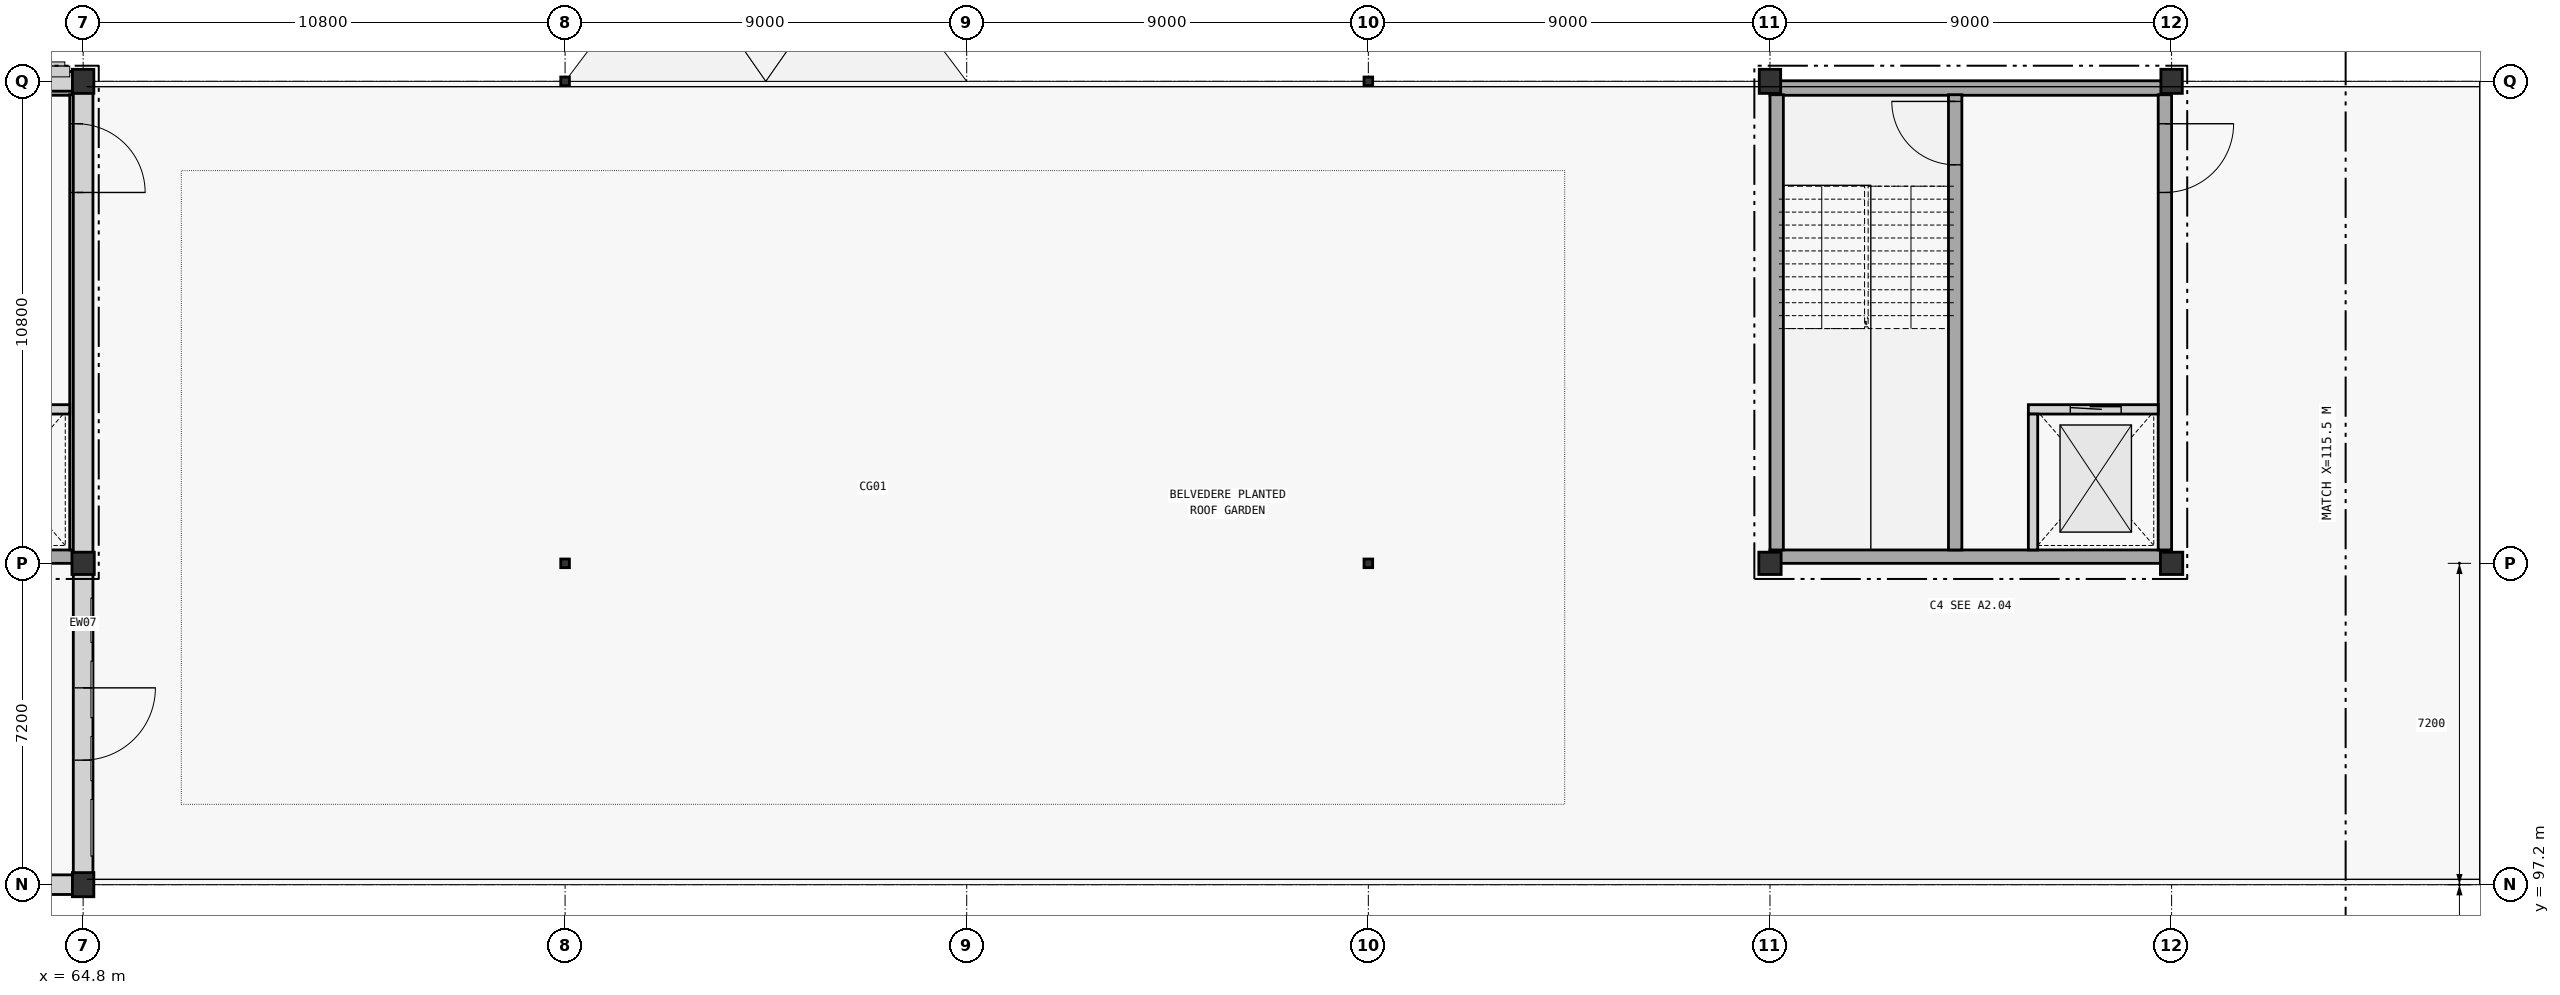
"""IFC4 building model, lengths in metres.
Left out: names, types, materials, properties, quantities, classifications, styles, units other than length and angle.
Written with IfcOpenShell. Run it as: python <this file> out.ifc"""

import sys

from ifc_helpers import new_model, si_unit, direction, frame, frame_2d, origin, origin_2d, place, context, subcontext, project, spatial, rectangle, hollow_circle, extrude, element, fill, save


model = new_model("IFC4")
c1 = context("Model", 3, precision=1e-05, world=origin(), true_north=direction((0.0, 1.0)))
c2 = subcontext(c1, "Body", "Model", "MODEL_VIEW")
j1 = project(units=[si_unit("LENGTHUNIT", "METRE"), si_unit("PLANEANGLEUNIT", "RADIAN")], contexts=[c1])
p1 = place(None, origin())
s1 = spatial("IfcSite", under=j1, at=p1, CompositionType="ELEMENT")
p2 = place(p1, origin())
s2 = spatial("IfcBuilding", under=s1, at=p2, CompositionType="ELEMENT")
p3 = place(p2, frame((0.0, 0.0, 19.2)))
s3 = spatial("IfcBuildingStorey", under=s2, at=p3, CompositionType="ELEMENT", Elevation=19.2)
p4 = place(p3, frame((64.8, 97.2, 0.0), z_axis=(0.0, 0.0, 1.0), x_axis=(1.0, 0.0, 0.0)))
e1 = element("IfcColumn", 1, at=p4, inside=s3, PredefinedType="COLUMN", context=c2, shape_type="SweptSolid", body=[
    extrude(rectangle(XDim=0.48, YDim=0.54, at=origin_2d()), origin(), (0.0, 0.0, 1.0), 4.2),
])
p5 = place(p3, frame((64.8, 104.4, 0.0), z_axis=(0.0, 0.0, 1.0), x_axis=(1.0, 0.0, 0.0)))
e2 = element("IfcColumn", 2, at=p5, inside=s3, PredefinedType="COLUMN", context=c2, shape_type="SweptSolid", body=[
    extrude(rectangle(XDim=0.5, YDim=0.5, at=origin_2d()), origin(), (0.0, 0.0, 1.0), 4.2),
])
p6 = place(p3, frame((64.8, 115.2, 0.0), z_axis=(0.0, 0.0, 1.0), x_axis=(1.0, 0.0, 0.0)))
e3 = element("IfcColumn", 3, at=p6, inside=s3, PredefinedType="COLUMN", context=c2, shape_type="SweptSolid", body=[
    extrude(rectangle(XDim=0.48, YDim=0.54, at=origin_2d()), origin(), (0.0, 0.0, 1.0), 4.2),
])
p7 = place(p3, frame((102.6, 104.4, 0.0), z_axis=(0.0, 0.0, 1.0), x_axis=(1.0, 0.0, 0.0)))
e4 = element("IfcColumn", 4, at=p7, inside=s3, PredefinedType="COLUMN", context=c2, shape_type="SweptSolid", body=[
    extrude(rectangle(XDim=0.5, YDim=0.5, at=origin_2d()), origin(), (0.0, 0.0, 1.0), 4.2),
])
p8 = place(p3, frame((102.6, 115.2, 0.0), z_axis=(0.0, 0.0, 1.0), x_axis=(1.0, 0.0, 0.0)))
e5 = element("IfcColumn", 5, at=p8, inside=s3, PredefinedType="COLUMN", context=c2, shape_type="SweptSolid", body=[
    extrude(rectangle(XDim=0.48, YDim=0.54, at=origin_2d()), origin(), (0.0, 0.0, 1.0), 4.2),
])
p9 = place(p3, frame((111.6, 104.4, 0.0), z_axis=(0.0, 0.0, 1.0), x_axis=(1.0, 0.0, 0.0)))
e6 = element("IfcColumn", 6, at=p9, inside=s3, PredefinedType="COLUMN", context=c2, shape_type="SweptSolid", body=[
    extrude(rectangle(XDim=0.5, YDim=0.5, at=origin_2d()), origin(), (0.0, 0.0, 1.0), 4.2),
])
p10 = place(p3, frame((111.6, 115.2, 0.0), z_axis=(0.0, 0.0, 1.0), x_axis=(1.0, 0.0, 0.0)))
e7 = element("IfcColumn", 7, at=p10, inside=s3, PredefinedType="COLUMN", context=c2, shape_type="SweptSolid", body=[
    extrude(rectangle(XDim=0.48, YDim=0.54, at=origin_2d()), origin(), (0.0, 0.0, 1.0), 4.2),
])
p11 = place(p3, frame((64.8, 104.55, 0.0), z_axis=(0.0, 0.0, 1.0), x_axis=(-1.0, 0.0, 0.0)))
e8 = element("IfcWall", 8, at=p11, inside=s3, PredefinedType="SHEAR", context=c2, shape_type="SweptSolid", body=[
    extrude(rectangle(XDim=10.8, YDim=0.3, at=frame_2d((5.4, 0.0))), origin(), (0.0, 0.0, 1.0), 4.2),
])
p12 = place(p3, frame((54.0, 115.05, 0.0), z_axis=(0.0, 0.0, 1.0), x_axis=(1.0, 0.0, 0.0)))
e9 = element("IfcWall", 9, at=p12, inside=s3, PredefinedType="SHEAR", context=c2, shape_type="SweptSolid", body=[
    extrude(rectangle(XDim=10.8, YDim=0.325, at=frame_2d((5.4, 0.0))), origin(), (0.0, 0.0, 1.0), 4.2),
])
p13 = place(p3, frame((64.65, 114.9, 0.0), z_axis=(0.0, 0.0, 1.0), x_axis=(0.0, -1.0, 0.0)))
e10 = element("IfcWall", 10, at=p13, inside=s3, PredefinedType="SHEAR", context=c2, shape_type="SweptSolid", body=[
    extrude(rectangle(XDim=10.2, YDim=0.3, at=frame_2d((5.1, 0.0))), origin(), (0.0, 0.0, 1.0), 4.2),
])
p14 = place(p13, frame((0.65, 0.0, 0.0)))
e11 = element("IfcOpeningElement", 11, at=p14, cuts=e10, PredefinedType="OPENING", context=c2, shape_type="SweptSolid", body=[
    extrude(rectangle(XDim=1.54, YDim=2.22, at=frame_2d((0.77, 1.11))), frame((0.0, 0.15, 0.0), z_axis=(0.0, -1.0, 0.0), x_axis=(1.0, 0.0, 0.0)), (0.0, 0.0, 1.0), 0.3),
])
p15 = place(p3, frame((111.6, 104.55, 0.0), z_axis=(0.0, 0.0, 1.0), x_axis=(-1.0, 0.0, 0.0)))
e12 = element("IfcWall", 12, at=p15, inside=s3, PredefinedType="SHEAR", context=c2, shape_type="SweptSolid", body=[
    extrude(rectangle(XDim=9.0, YDim=0.3, at=frame_2d((4.5, 0.0))), origin(), (0.0, 0.0, 1.0), 4.2),
])
p16 = place(p3, frame((102.6, 115.05, 0.0), z_axis=(0.0, 0.0, 1.0), x_axis=(1.0, 0.0, 0.0)))
e13 = element("IfcWall", 13, at=p16, inside=s3, PredefinedType="SHEAR", context=c2, shape_type="SweptSolid", body=[
    extrude(rectangle(XDim=9.0, YDim=0.325, at=frame_2d((4.5, 0.0))), origin(), (0.0, 0.0, 1.0), 4.2),
])
p17 = place(p3, frame((102.75, 104.7, 0.0), z_axis=(0.0, 0.0, 1.0), x_axis=(0.0, 1.0, 0.0)))
e14 = element("IfcWall", 14, at=p17, inside=s3, PredefinedType="SHEAR", context=c2, shape_type="SweptSolid", body=[
    extrude(rectangle(XDim=10.2, YDim=0.3, at=frame_2d((5.1, 0.0))), origin(), (0.0, 0.0, 1.0), 4.2),
])
p18 = place(p3, frame((111.45, 114.9, 0.0), z_axis=(0.0, 0.0, 1.0), x_axis=(0.0, -1.0, 0.0)))
e15 = element("IfcWall", 15, at=p18, inside=s3, PredefinedType="SHEAR", context=c2, shape_type="SweptSolid", body=[
    extrude(rectangle(XDim=10.2, YDim=0.3, at=frame_2d((5.1, 0.0))), origin(), (0.0, 0.0, 1.0), 4.2),
])
p19 = place(p18, frame((0.65, 0.0, 0.0)))
e16 = element("IfcOpeningElement", 16, at=p19, cuts=e15, PredefinedType="OPENING", context=c2, shape_type="SweptSolid", body=[
    extrude(rectangle(XDim=1.54, YDim=2.22, at=frame_2d((0.77, 1.11))), frame((0.0, 0.15, 0.0), z_axis=(0.0, -1.0, 0.0), x_axis=(1.0, 0.0, 0.0)), (0.0, 0.0, 1.0), 0.3),
])
p20 = place(p3, frame((106.75, 104.7, 0.0), z_axis=(0.0, 0.0, 1.0), x_axis=(0.0, 1.0, 0.0)))
e17 = element("IfcWall", 17, at=p20, inside=s3, PredefinedType="SHEAR", context=c2, shape_type="SweptSolid", body=[
    extrude(rectangle(XDim=10.2, YDim=0.3, at=frame_2d((5.1, 0.0))), origin(), (0.0, 0.0, 1.0), 4.2),
])
p21 = place(p20, frame((8.63, 0.0, 0.0)))
e18 = element("IfcOpeningElement", 18, at=p21, cuts=e17, PredefinedType="OPENING", context=c2, shape_type="SweptSolid", body=[
    extrude(rectangle(XDim=1.42, YDim=2.2, at=frame_2d((0.71, 1.1))), frame((0.0, 0.15, 0.0), z_axis=(0.0, -1.0, 0.0), x_axis=(1.0, 0.0, 0.0)), (0.0, 0.0, 1.0), 0.3),
])
for number, where, z_axis, x_axis in (
    (19, (75.6, 104.4, 0.0), (0.0, 0.0, 1.0), (1.0, 0.0, 0.0)),
    (20, (93.6, 104.4, 0.0), (0.0, 0.0, 1.0), (1.0, 0.0, 0.0)),
    (21, (75.6, 115.2, 0.0), (0.0, 0.0, 1.0), (1.0, 0.0, 0.0)),
    (22, (93.6, 115.2, 0.0), (0.0, 0.0, 1.0), (1.0, 0.0, 0.0)),
):
    element("IfcColumn", number, at=place(p3, frame(where, z_axis=z_axis, x_axis=x_axis)), inside=s3, PredefinedType="COLUMN", context=c2, shape_type="SweptSolid", body=[
        extrude(hollow_circle(Radius=0.097, WallThickness=0.01, at=origin_2d()), origin(), (0.0, 0.0, 1.0), 2.85),
    ])
p22 = place(p3, frame((64.8, 104.154, 0.0), z_axis=(0.0, 0.0, 1.0), x_axis=(0.0, -1.0, 0.0)))
e23 = element("IfcWall", 23, at=p22, inside=s3, PredefinedType="STANDARD", context=c2, shape_type="SweptSolid", body=[
    extrude(rectangle(XDim=6.688, YDim=0.38, at=frame_2d((3.344, 0.0))), origin(), (0.0, 0.0, 1.0), 3.245),
])
p23 = place(p22, frame((2.544, 0.0, 0.0)))
e24 = element("IfcOpeningElement", 24, at=p23, cuts=e23, PredefinedType="OPENING", context=c2, shape_type="SweptSolid", body=[
    extrude(rectangle(XDim=1.62, YDim=2.26, at=frame_2d((0.81, 1.13))), frame((0.0, 0.19, 0.0), z_axis=(0.0, -1.0, 0.0), x_axis=(1.0, 0.0, 0.0)), (0.0, 0.0, 1.0), 0.38),
])
p24 = place(p3, frame((64.564, 97.2, 0.0), z_axis=(0.0, 0.0, 1.0), x_axis=(-1.0, 0.0, 0.0)))
e25 = element("IfcWall", 25, at=p24, inside=s3, PredefinedType="STANDARD", context=c2, shape_type="SweptSolid", body=[
    extrude(rectangle(XDim=10.328, YDim=0.38, at=frame_2d((5.164, 0.0))), origin(), (0.0, 0.0, 1.0), 3.155),
])
p25 = place(p24, frame((4.484, 0.0, 0.9)))
e26 = element("IfcOpeningElement", 26, at=p25, cuts=e25, PredefinedType="OPENING", context=c2, shape_type="SweptSolid", body=[
    extrude(rectangle(XDim=1.36, YDim=1.86, at=frame_2d((0.68, 0.93))), frame((0.0, 0.19, 0.0), z_axis=(0.0, -1.0, 0.0), x_axis=(1.0, 0.0, 0.0)), (0.0, 0.0, 1.0), 0.38),
])
p26 = place(p3, frame((0.1, 115.2, 4.2), z_axis=(0.0, 0.0, 1.0), x_axis=(1.0, 0.0, 0.0)))
e27 = element("IfcWall", 27, at=p26, inside=s3, PredefinedType="PARAPET", context=c2, shape_type="SweptSolid", body=[
    extrude(rectangle(XDim=64.6, YDim=0.44, at=frame_2d((32.3, 0.0))), origin(), (0.0, 0.0, 1.0), 0.95),
])
p27 = place(p3, frame((64.8, 115.1, 4.2), z_axis=(0.0, 0.0, 1.0), x_axis=(0.0, -1.0, 0.0)))
e28 = element("IfcWall", 28, at=p27, inside=s3, PredefinedType="PARAPET", context=c2, shape_type="SweptSolid", body=[
    extrude(rectangle(XDim=17.8, YDim=0.44, at=frame_2d((8.9, 0.0))), origin(), (0.0, 0.0, 1.0), 0.95),
])
p28 = place(p3, frame((64.7, 97.2, 4.2), z_axis=(0.0, 0.0, 1.0), x_axis=(-1.0, 0.0, 0.0)))
e29 = element("IfcWall", 29, at=p28, inside=s3, PredefinedType="PARAPET", context=c2, shape_type="SweptSolid", body=[
    extrude(rectangle(XDim=64.6, YDim=0.44, at=frame_2d((32.3, 0.0))), origin(), (0.0, 0.0, 1.0), 0.95),
])
p29 = place(p3, frame((61.59, 107.85, 0.0), z_axis=(0.0, 0.0, 1.0), x_axis=(1.0, 0.0, 0.0)))
e30 = element("IfcWall", 30, at=p29, inside=s3, PredefinedType="STANDARD", context=c2, shape_type="SweptSolid", body=[
    extrude(rectangle(XDim=2.91, YDim=0.21, at=frame_2d((1.455, 0.0))), origin(), (0.0, 0.0, 1.0), 4.2),
])
p30 = place(p29, frame((0.99, 0.0, 0.0)))
e31 = element("IfcOpeningElement", 31, at=p30, cuts=e30, PredefinedType="OPENING", context=c2, shape_type="SweptSolid", body=[
    extrude(rectangle(XDim=1.04, YDim=2.16, at=frame_2d((0.52, 1.08))), frame((0.0, 0.105, 0.0), z_axis=(0.0, -1.0, 0.0), x_axis=(1.0, 0.0, 0.0)), (0.0, 0.0, 1.0), 0.21),
])
p31 = place(p3, frame((108.39, 107.85, 0.0), z_axis=(0.0, 0.0, 1.0), x_axis=(1.0, 0.0, 0.0)))
e32 = element("IfcWall", 32, at=p31, inside=s3, PredefinedType="STANDARD", context=c2, shape_type="SweptSolid", body=[
    extrude(rectangle(XDim=2.91, YDim=0.21, at=frame_2d((1.455, 0.0))), origin(), (0.0, 0.0, 1.0), 4.2),
])
p32 = place(p31, frame((0.94, 0.0, 0.0)))
e33 = element("IfcOpeningElement", 33, at=p32, cuts=e32, PredefinedType="OPENING", context=c2, shape_type="SweptSolid", body=[
    extrude(rectangle(XDim=1.14, YDim=2.16, at=frame_2d((0.57, 1.08))), frame((0.0, 0.105, 0.0), z_axis=(0.0, -1.0, 0.0), x_axis=(1.0, 0.0, 0.0)), (0.0, 0.0, 1.0), 0.21),
])
p33 = place(p3, frame((108.495, 104.7, 0.0), z_axis=(0.0, 0.0, 1.0), x_axis=(0.0, 1.0, 0.0)))
e34 = element("IfcWall", 34, at=p33, inside=s3, PredefinedType="STANDARD", context=c2, shape_type="SweptSolid", body=[
    extrude(rectangle(XDim=3.045, YDim=0.21, at=frame_2d((1.522, 0.0))), origin(), (0.0, 0.0, 1.0), 4.2),
])
p34 = place(p23, origin())
e35 = element("IfcDoor", 35, at=p34, inside=s3, OperationType="SINGLE_SWING_LEFT", PredefinedType="DOOR", context=c2, shape_type="SweptSolid", body=[
    extrude(rectangle(XDim=1.62, YDim=2.26, at=frame_2d((0.81, 1.13))), frame((0.0, 0.025, 0.0), z_axis=(0.0, -1.0, 0.0), x_axis=(1.0, 0.0, 0.0)), (0.0, 0.0, 1.0), 0.05),
])
fill(e24, e35)
p35 = place(p14, origin())
e36 = element("IfcDoor", 36, at=p35, inside=s3, OperationType="SINGLE_SWING_RIGHT", PredefinedType="DOOR", context=c2, shape_type="SweptSolid", body=[
    extrude(rectangle(XDim=1.54, YDim=2.22, at=frame_2d((0.77, 1.11))), frame((0.0, 0.025, 0.0), z_axis=(0.0, -1.0, 0.0), x_axis=(1.0, 0.0, 0.0)), (0.0, 0.0, 1.0), 0.05),
])
fill(e11, e36)
p36 = place(p32, origin())
e37 = element("IfcDoor", 37, at=p36, inside=s3, OperationType="SLIDING_TO_LEFT", PredefinedType="DOOR", context=c2, shape_type="SweptSolid", body=[
    extrude(rectangle(XDim=1.14, YDim=2.16, at=frame_2d((0.57, 1.08))), frame((0.0, 0.025, 0.0), z_axis=(0.0, -1.0, 0.0), x_axis=(1.0, 0.0, 0.0)), (0.0, 0.0, 1.0), 0.05),
])
fill(e33, e37)
p37 = place(p21, origin())
e38 = element("IfcDoor", 38, at=p37, inside=s3, OperationType="SINGLE_SWING_RIGHT", PredefinedType="DOOR", context=c2, shape_type="SweptSolid", body=[
    extrude(rectangle(XDim=1.42, YDim=2.2, at=frame_2d((0.71, 1.1))), frame((0.0, 0.025, 0.0), z_axis=(0.0, -1.0, 0.0), x_axis=(1.0, 0.0, 0.0)), (0.0, 0.0, 1.0), 0.05),
])
fill(e18, e38)
p38 = place(p19, origin())
e39 = element("IfcDoor", 39, at=p38, inside=s3, OperationType="SINGLE_SWING_LEFT", PredefinedType="DOOR", context=c2, shape_type="SweptSolid", body=[
    extrude(rectangle(XDim=1.54, YDim=2.22, at=frame_2d((0.77, 1.11))), frame((0.0, 0.025, 0.0), z_axis=(0.0, -1.0, 0.0), x_axis=(1.0, 0.0, 0.0)), (0.0, 0.0, 1.0), 0.05),
])
fill(e16, e39)
save(model, sys.argv[1])
